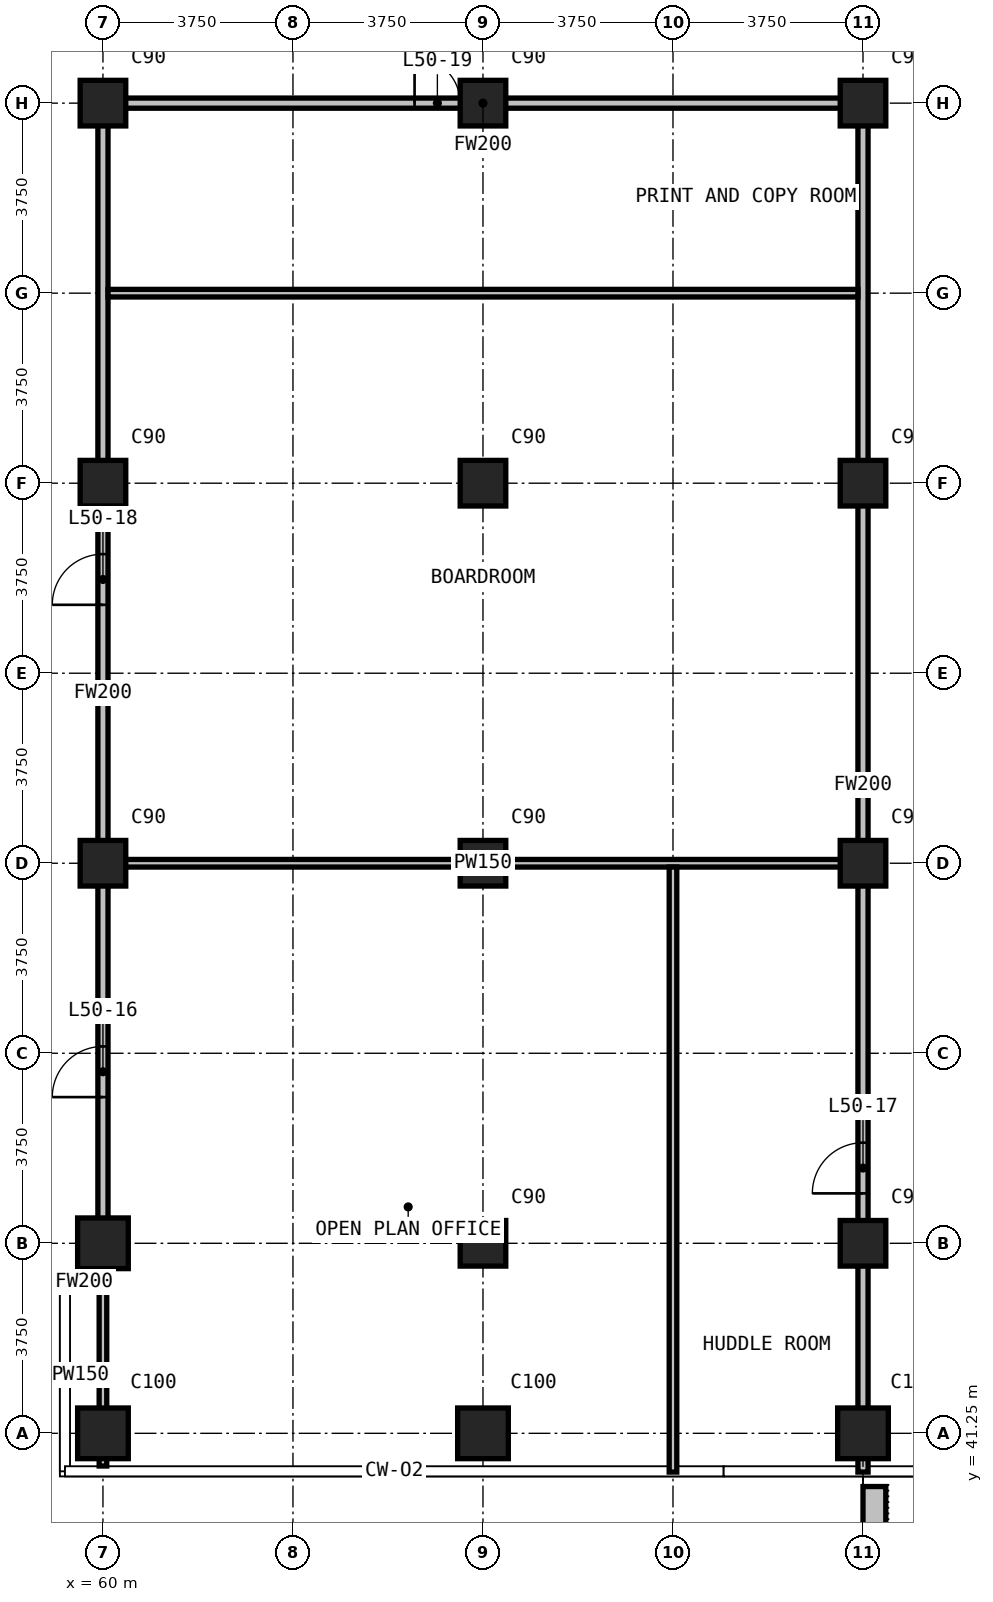
"""IFC4 building model, lengths in metres.
Left out: names, types, materials, properties, quantities, classifications, styles, units other than length and angle.
Written with IfcOpenShell. Run it as: python <this file> out.ifc"""

import sys

from ifc_helpers import new_model, si_unit, direction, frame, frame_2d, origin, origin_2d, place, context, subcontext, project, spatial, rectangle, extrude, element, fill, save


model = new_model("IFC4")
c1 = context("Model", 3, precision=1e-05, world=origin(), true_north=direction((0.0, 1.0)))
c2 = subcontext(c1, "Body", "Model", "MODEL_VIEW")
j1 = project(units=[si_unit("LENGTHUNIT", "METRE"), si_unit("PLANEANGLEUNIT", "RADIAN")], contexts=[c1])
p1 = place(None, origin())
s1 = spatial("IfcSite", under=j1, at=p1, CompositionType="ELEMENT")
p2 = place(p1, origin())
s2 = spatial("IfcBuilding", under=s1, at=p2, CompositionType="ELEMENT")
p3 = place(p2, frame((0.0, 0.0, 195.9)))
s3 = spatial("IfcBuildingStorey", under=s2, at=p3, CompositionType="ELEMENT", Elevation=195.9)
for number, where, z_axis, x_axis in (
    (1, (60.0, 41.25, 0.0), (0.0, 0.0, 1.0), (1.0, 0.0, 0.0)),
    (2, (60.0, 45.0, 0.0), (0.0, 0.0, 1.0), (1.0, 0.0, 0.0)),
):
    element("IfcColumn", number, at=place(p3, frame(where, z_axis=z_axis, x_axis=x_axis)), inside=s3, PredefinedType="COLUMN", context=c2, shape_type="SweptSolid", body=[
        extrude(rectangle(XDim=1.0, YDim=1.0, at=origin_2d()), origin(), (0.0, 0.0, 1.0), 3.6),
    ])
for number, where, z_axis, x_axis in (
    (3, (60.0, 52.5, 0.0), (0.0, 0.0, 1.0), (1.0, 0.0, 0.0)),
    (4, (60.0, 60.0, 0.0), (0.0, 0.0, 1.0), (1.0, 0.0, 0.0)),
    (5, (60.0, 67.5, 0.0), (0.0, 0.0, 1.0), (1.0, 0.0, 0.0)),
):
    element("IfcColumn", number, at=place(p3, frame(where, z_axis=z_axis, x_axis=x_axis)), inside=s3, PredefinedType="COLUMN", context=c2, shape_type="SweptSolid", body=[
        extrude(rectangle(XDim=0.9, YDim=0.9, at=origin_2d()), origin(), (0.0, 0.0, 1.0), 3.6),
    ])
p4 = place(p3, frame((67.5, 41.25, 0.0), z_axis=(0.0, 0.0, 1.0), x_axis=(1.0, 0.0, 0.0)))
e6 = element("IfcColumn", 6, at=p4, inside=s3, PredefinedType="COLUMN", context=c2, shape_type="SweptSolid", body=[
    extrude(rectangle(XDim=1.0, YDim=1.0, at=origin_2d()), origin(), (0.0, 0.0, 1.0), 3.6),
])
for number, where, z_axis, x_axis in (
    (7, (67.5, 45.0, 0.0), (0.0, 0.0, 1.0), (1.0, 0.0, 0.0)),
    (8, (67.5, 52.5, 0.0), (0.0, 0.0, 1.0), (1.0, 0.0, 0.0)),
    (9, (67.5, 60.0, 0.0), (0.0, 0.0, 1.0), (1.0, 0.0, 0.0)),
    (10, (67.5, 67.5, 0.0), (0.0, 0.0, 1.0), (1.0, 0.0, 0.0)),
):
    element("IfcColumn", number, at=place(p3, frame(where, z_axis=z_axis, x_axis=x_axis)), inside=s3, PredefinedType="COLUMN", context=c2, shape_type="SweptSolid", body=[
        extrude(rectangle(XDim=0.9, YDim=0.9, at=origin_2d()), origin(), (0.0, 0.0, 1.0), 3.6),
    ])
p5 = place(p3, frame((75.0, 41.25, 0.0), z_axis=(0.0, 0.0, 1.0), x_axis=(1.0, 0.0, 0.0)))
e11 = element("IfcColumn", 11, at=p5, inside=s3, PredefinedType="COLUMN", context=c2, shape_type="SweptSolid", body=[
    extrude(rectangle(XDim=1.0, YDim=1.0, at=origin_2d()), origin(), (0.0, 0.0, 1.0), 3.6),
])
for number, where, z_axis, x_axis in (
    (12, (75.0, 45.0, 0.0), (0.0, 0.0, 1.0), (1.0, 0.0, 0.0)),
    (13, (75.0, 52.5, 0.0), (0.0, 0.0, 1.0), (1.0, 0.0, 0.0)),
    (14, (75.0, 60.0, 0.0), (0.0, 0.0, 1.0), (1.0, 0.0, 0.0)),
    (15, (75.0, 67.5, 0.0), (0.0, 0.0, 1.0), (1.0, 0.0, 0.0)),
):
    element("IfcColumn", number, at=place(p3, frame(where, z_axis=z_axis, x_axis=x_axis)), inside=s3, PredefinedType="COLUMN", context=c2, shape_type="SweptSolid", body=[
        extrude(rectangle(XDim=0.9, YDim=0.9, at=origin_2d()), origin(), (0.0, 0.0, 1.0), 3.6),
    ])
p6 = place(p3, frame((75.225, 40.2, 0.0), z_axis=(0.0, 0.0, 1.0), x_axis=(0.0, -1.0, 0.0)))
e16 = element("IfcWall", 16, at=p6, inside=s3, PredefinedType="USERDEFINED", context=c2, shape_type="SweptSolid", body=[
    extrude(rectangle(XDim=2.35, YDim=0.45, at=frame_2d((1.175, 0.0))), origin(), (0.0, 0.0, 1.0), 1.1),
])
p7 = place(p3, frame((59.355, 44.235, 0.0), z_axis=(0.0, 0.0, 1.0), x_axis=(1.0, 0.0, 0.0)))
e17 = element("IfcWall", 17, at=p7, inside=s3, PredefinedType="PARTITIONING", context=c2, shape_type="SweptSolid", body=[
    extrude(rectangle(XDim=0.545, YDim=0.2, at=frame_2d((0.272, 0.0))), origin(), (0.0, 0.0, 1.0), 3.3),
])
p8 = place(p3, frame((60.1, 67.5, 0.0), z_axis=(0.0, 0.0, 1.0), x_axis=(1.0, 0.0, 0.0)))
e18 = element("IfcWall", 18, at=p8, inside=s3, PredefinedType="PARTITIONING", context=c2, shape_type="SweptSolid", body=[
    extrude(rectangle(XDim=14.8, YDim=0.2, at=frame_2d((7.4, 0.0))), origin(), (0.0, 0.0, 1.0), 3.3),
])
p9 = place(p8, frame((6.05, 0.0, 0.0)))
e19 = element("IfcOpeningElement", 19, at=p9, cuts=e18, PredefinedType="OPENING", context=c2, shape_type="SweptSolid", body=[
    extrude(rectangle(XDim=0.9, YDim=2.2, at=frame_2d((0.45, 1.1))), frame((0.0, 0.11, 0.0), z_axis=(0.0, -1.0, 0.0), x_axis=(1.0, 0.0, 0.0)), (0.0, 0.0, 1.0), 0.22),
])
p10 = place(p3, frame((60.0, 44.135, 0.0), z_axis=(0.0, 0.0, 1.0), x_axis=(0.0, 1.0, 0.0)))
e20 = element("IfcWall", 20, at=p10, inside=s3, PredefinedType="PARTITIONING", context=c2, shape_type="SweptSolid", body=[
    extrude(rectangle(XDim=23.465, YDim=0.2, at=frame_2d((11.732, 0.0))), origin(), (0.0, 0.0, 1.0), 3.3),
])
p11 = place(p10, frame((3.75, 0.0, 0.0)))
e21 = element("IfcOpeningElement", 21, at=p11, cuts=e20, PredefinedType="OPENING", context=c2, shape_type="SweptSolid", body=[
    extrude(rectangle(XDim=1.0, YDim=2.2, at=frame_2d((0.5, 1.1))), frame((0.0, 0.11, 0.0), z_axis=(0.0, -1.0, 0.0), x_axis=(1.0, 0.0, 0.0)), (0.0, 0.0, 1.0), 0.22),
])
p12 = place(p10, frame((13.465, 0.0, 0.0)))
e22 = element("IfcOpeningElement", 22, at=p12, cuts=e20, PredefinedType="OPENING", context=c2, shape_type="SweptSolid", body=[
    extrude(rectangle(XDim=1.0, YDim=2.2, at=frame_2d((0.5, 1.1))), frame((0.0, 0.11, 0.0), z_axis=(0.0, -1.0, 0.0), x_axis=(1.0, 0.0, 0.0)), (0.0, 0.0, 1.0), 0.22),
])
p13 = place(p3, frame((75.0, 40.485, 0.0), z_axis=(0.0, 0.0, 1.0), x_axis=(0.0, 1.0, 0.0)))
e23 = element("IfcWall", 23, at=p13, inside=s3, PredefinedType="PARTITIONING", context=c2, shape_type="SweptSolid", body=[
    extrude(rectangle(XDim=27.115, YDim=0.2, at=frame_2d((13.558, 0.0))), origin(), (0.0, 0.0, 1.0), 3.3),
])
p14 = place(p13, frame((5.5, 0.0, 0.0)))
e24 = element("IfcOpeningElement", 24, at=p14, cuts=e23, PredefinedType="OPENING", context=c2, shape_type="SweptSolid", body=[
    extrude(rectangle(XDim=1.0, YDim=2.2, at=frame_2d((0.5, 1.1))), frame((0.0, 0.11, 0.0), z_axis=(0.0, -1.0, 0.0), x_axis=(1.0, 0.0, 0.0)), (0.0, 0.0, 1.0), 0.22),
])
for number, where, z_axis, x_axis in (
    (25, (60.1, 52.5, 0.0), (0.0, 0.0, 1.0), (1.0, 0.0, 0.0)),
    (26, (60.1, 63.75, 0.0), (0.0, 0.0, 1.0), (1.0, 0.0, 0.0)),
):
    element("IfcWall", number, at=place(p3, frame(where, z_axis=z_axis, x_axis=x_axis)), inside=s3, PredefinedType="PARTITIONING", context=c2, shape_type="SweptSolid", body=[
        extrude(rectangle(XDim=14.8, YDim=0.15, at=frame_2d((7.4, 0.0))), origin(), (0.0, 0.0, 1.0), 3.3),
    ])
p15 = place(p3, frame((60.0, 40.605, 0.0), z_axis=(0.0, 0.0, 1.0), x_axis=(0.0, 1.0, 0.0)))
e27 = element("IfcWall", 27, at=p15, inside=s3, PredefinedType="PARTITIONING", context=c2, shape_type="SweptSolid", body=[
    extrude(rectangle(XDim=3.6, YDim=0.15, at=frame_2d((1.8, 0.0))), origin(), (0.0, 0.0, 1.0), 3.3),
])
p16 = place(p3, frame((71.25, 40.485, 0.0), z_axis=(0.0, 0.0, 1.0), x_axis=(0.0, 1.0, 0.0)))
e28 = element("IfcWall", 28, at=p16, inside=s3, PredefinedType="PARTITIONING", context=c2, shape_type="SweptSolid", body=[
    extrude(rectangle(XDim=11.94, YDim=0.15, at=frame_2d((5.97, 0.0))), origin(), (0.0, 0.0, 1.0), 3.3),
])
p17 = place(p11, origin())
e29 = element("IfcDoor", 29, at=p17, inside=s3, OperationType="SINGLE_SWING_LEFT", PredefinedType="DOOR", context=c2, shape_type="SweptSolid", body=[
    extrude(rectangle(XDim=1.0, YDim=2.2, at=frame_2d((0.5, 1.1))), frame((0.0, 0.025, 0.0), z_axis=(0.0, -1.0, 0.0), x_axis=(1.0, 0.0, 0.0)), (0.0, 0.0, 1.0), 0.05),
])
fill(e21, e29)
p18 = place(p14, origin())
e30 = element("IfcDoor", 30, at=p18, inside=s3, OperationType="SINGLE_SWING_LEFT", PredefinedType="DOOR", context=c2, shape_type="SweptSolid", body=[
    extrude(rectangle(XDim=1.0, YDim=2.2, at=frame_2d((0.5, 1.1))), frame((0.0, 0.025, 0.0), z_axis=(0.0, -1.0, 0.0), x_axis=(1.0, 0.0, 0.0)), (0.0, 0.0, 1.0), 0.05),
])
fill(e24, e30)
p19 = place(p12, origin())
e31 = element("IfcDoor", 31, at=p19, inside=s3, OperationType="SINGLE_SWING_LEFT", PredefinedType="DOOR", context=c2, shape_type="SweptSolid", body=[
    extrude(rectangle(XDim=1.0, YDim=2.2, at=frame_2d((0.5, 1.1))), frame((0.0, 0.025, 0.0), z_axis=(0.0, -1.0, 0.0), x_axis=(1.0, 0.0, 0.0)), (0.0, 0.0, 1.0), 0.05),
])
fill(e22, e31)
p20 = place(p9, origin())
e32 = element("IfcDoor", 32, at=p20, inside=s3, OperationType="SINGLE_SWING_RIGHT", PredefinedType="DOOR", context=c2, shape_type="SweptSolid", body=[
    extrude(rectangle(XDim=0.9, YDim=2.2, at=frame_2d((0.45, 1.1))), frame((0.0, 0.025, 0.0), z_axis=(0.0, -1.0, 0.0), x_axis=(1.0, 0.0, 0.0)), (0.0, 0.0, 1.0), 0.05),
])
fill(e19, e32)
save(model, sys.argv[1])
